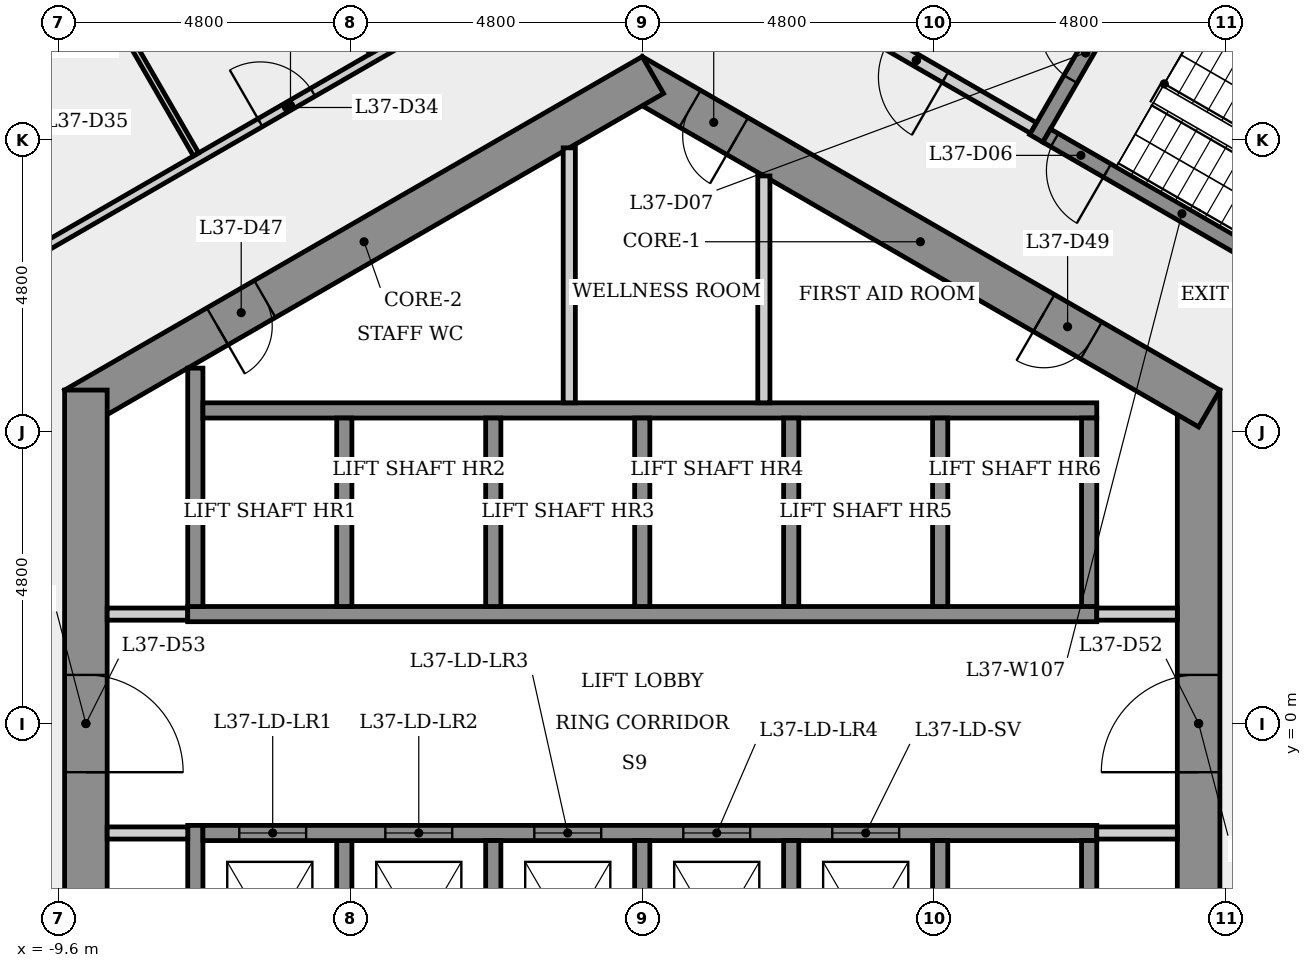
"""IFC4 building model, lengths in metres.
Left out: names, types, materials, properties, quantities, classifications, styles, units other than length and angle.
Written with IfcOpenShell. Run it as: python <this file> out.ifc"""

import sys

from ifc_helpers import new_model, si_unit, direction, frame, frame_2d, origin, place, context, subcontext, project, spatial, rectangle, extrude, element, fill, save


model = new_model("IFC4")
c1 = context("Model", 3, precision=1e-05, world=origin(), true_north=direction((0.0, 1.0)))
c2 = subcontext(c1, "Body", "Model", "MODEL_VIEW")
j1 = project(units=[si_unit("LENGTHUNIT", "METRE"), si_unit("PLANEANGLEUNIT", "RADIAN")], contexts=[c1])
p1 = place(None, origin())
s1 = spatial("IfcSite", under=j1, at=p1, CompositionType="ELEMENT")
p2 = place(p1, origin())
s2 = spatial("IfcBuilding", under=s1, at=p2, CompositionType="ELEMENT")
p3 = place(p2, frame((0.0, 0.0, 139.9)))
s3 = spatial("IfcBuildingStorey", under=s2, at=p3, CompositionType="ELEMENT", Elevation=139.9)
p4 = place(p3, frame((9.15, -5.485, 0.0), z_axis=(0.0, 0.0, 1.0), x_axis=(0.0, 1.0, 0.0)))
e1 = element("IfcWall", 1, at=p4, inside=s3, PredefinedType="SHEAR", context=c2, shape_type="SweptSolid", body=[
    extrude(rectangle(XDim=10.97, YDim=0.7, at=frame_2d((5.485, 0.0))), origin(), (0.0, 0.0, 1.0), 4.0),
])
p5 = place(p4, frame((4.685, 0.0, 0.0)))
e2 = element("IfcOpeningElement", 2, at=p5, cuts=e1, PredefinedType="OPENING", context=c2, shape_type="SweptSolid", body=[
    extrude(rectangle(XDim=1.6, YDim=2.1, at=frame_2d((0.8, 1.05))), frame((0.0, 0.36, 0.0), z_axis=(0.0, -1.0, 0.0), x_axis=(1.0, 0.0, 0.0)), (0.0, 0.0, 1.0), 0.72),
])
p6 = place(p3, frame((9.325, 5.182, 0.0), z_axis=(0.0, 0.0, 1.0), x_axis=(-0.866023993627, 0.500002442456, 0.0)))
e3 = element("IfcWall", 3, at=p6, inside=s3, PredefinedType="SHEAR", context=c2, shape_type="SweptSolid", body=[
    extrude(rectangle(XDim=10.97, YDim=0.7, at=frame_2d((5.485, 0.0))), origin(), (0.0, 0.0, 1.0), 4.0),
])
p7 = place(p6, frame((8.96, 0.0, 0.0)))
e4 = element("IfcOpeningElement", 4, at=p7, cuts=e3, PredefinedType="OPENING", context=c2, shape_type="SweptSolid", body=[
    extrude(rectangle(XDim=0.9, YDim=2.1, at=frame_2d((0.45, 1.05))), frame((0.0, 0.36, 0.0), z_axis=(0.0, -1.0, 0.0), x_axis=(1.0, 0.0, 0.0)), (0.0, 0.0, 1.0), 0.72),
])
p8 = place(p6, frame((2.24, 0.0, 0.0)))
e5 = element("IfcOpeningElement", 5, at=p8, cuts=e3, PredefinedType="OPENING", context=c2, shape_type="SweptSolid", body=[
    extrude(rectangle(XDim=0.9, YDim=2.1, at=frame_2d((0.45, 1.05))), frame((0.0, 0.36, 0.0), z_axis=(0.0, -1.0, 0.0), x_axis=(1.0, 0.0, 0.0)), (0.0, 0.0, 1.0), 0.72),
])
p9 = place(p3, frame((0.175, 10.667, 0.0), z_axis=(0.0, 0.0, 1.0), x_axis=(-0.866023993627, -0.500002442456, 0.0)))
e6 = element("IfcWall", 6, at=p9, inside=s3, PredefinedType="SHEAR", context=c2, shape_type="SweptSolid", body=[
    extrude(rectangle(XDim=10.97, YDim=0.7, at=frame_2d((5.485, 0.0))), origin(), (0.0, 0.0, 1.0), 4.0),
])
p10 = place(p9, frame((7.368, 0.0, 0.0)))
e7 = element("IfcOpeningElement", 7, at=p10, cuts=e6, PredefinedType="OPENING", context=c2, shape_type="SweptSolid", body=[
    extrude(rectangle(XDim=0.9, YDim=2.1, at=frame_2d((0.45, 1.05))), frame((0.0, 0.36, 0.0), z_axis=(0.0, -1.0, 0.0), x_axis=(1.0, 0.0, 0.0)), (0.0, 0.0, 1.0), 0.72),
])
p11 = place(p3, frame((-9.15, 5.485, 0.0), z_axis=(0.0, 0.0, 1.0), x_axis=(0.0, -1.0, 0.0)))
e8 = element("IfcWall", 8, at=p11, inside=s3, PredefinedType="SHEAR", context=c2, shape_type="SweptSolid", body=[
    extrude(rectangle(XDim=10.97, YDim=0.7, at=frame_2d((5.485, 0.0))), origin(), (0.0, 0.0, 1.0), 4.0),
])
p12 = place(p11, frame((4.685, 0.0, 0.0)))
e9 = element("IfcOpeningElement", 9, at=p12, cuts=e8, PredefinedType="OPENING", context=c2, shape_type="SweptSolid", body=[
    extrude(rectangle(XDim=1.6, YDim=2.1, at=frame_2d((0.8, 1.05))), frame((0.0, 0.36, 0.0), z_axis=(0.0, -1.0, 0.0), x_axis=(1.0, 0.0, 0.0)), (0.0, 0.0, 1.0), 0.72),
])
p13 = place(p3, frame((-10.136, 7.658, 0.0), z_axis=(0.0, 0.0, 1.0), x_axis=(0.866041139319, 0.499972744263, 0.0)))
e10 = element("IfcWall", 10, at=p13, inside=s3, PredefinedType="PARTITIONING", context=c2, shape_type="SweptSolid", body=[
    extrude(rectangle(XDim=10.048, YDim=0.15, at=frame_2d((5.024, 0.0))), origin(), (0.0, 0.0, 1.0), 3.6),
])
p14 = place(p13, frame((4.449, 0.0, 0.0)))
e11 = element("IfcOpeningElement", 11, at=p14, cuts=e10, PredefinedType="OPENING", context=c2, shape_type="SweptSolid", body=[
    extrude(rectangle(XDim=1.0, YDim=2.1, at=frame_2d((0.5, 1.05))), frame((0.0, 0.085, 0.0), z_axis=(0.0, -1.0, 0.0), x_axis=(1.0, 0.0, 0.0)), (0.0, 0.0, 1.0), 0.17),
])
p15 = place(p3, frame((-8.8, 1.8, 0.0), z_axis=(0.0, 0.0, 1.0), x_axis=(1.0, 0.0, 0.0)))
e12 = element("IfcWall", 12, at=p15, inside=s3, PredefinedType="PARTITIONING", context=c2, shape_type="SweptSolid", body=[
    extrude(rectangle(XDim=1.325, YDim=0.2, at=frame_2d((0.663, 0.0))), origin(), (0.0, 0.0, 1.0), 3.6),
])
p16 = place(p3, frame((-7.475, 1.8, 0.0), z_axis=(0.0, 0.0, 1.0), x_axis=(1.0, 0.0, 0.0)))
e13 = element("IfcWall", 13, at=p16, inside=s3, PredefinedType="SHEAR", context=c2, shape_type="SweptSolid", body=[
    extrude(rectangle(XDim=14.95, YDim=0.25, at=frame_2d((7.475, 0.0))), origin(), (0.0, 0.0, 1.0), 3.6),
])
p17 = place(p3, frame((-7.35, -5.846, 0.0), z_axis=(0.0, 0.0, 1.0), x_axis=(0.0, 1.0, 0.0)))
e14 = element("IfcWall", 14, at=p17, inside=s3, PredefinedType="SHEAR", context=c2, shape_type="SweptSolid", body=[
    extrude(rectangle(XDim=4.171, YDim=0.25, at=frame_2d((2.085, 0.0))), origin(), (0.0, 0.0, 1.0), 3.6),
])
p18 = place(p3, frame((-7.35, 1.925, 0.0), z_axis=(0.0, 0.0, 1.0), x_axis=(0.0, 1.0, 0.0)))
e15 = element("IfcWall", 15, at=p18, inside=s3, PredefinedType="SHEAR", context=c2, shape_type="SweptSolid", body=[
    extrude(rectangle(XDim=3.921, YDim=0.25, at=frame_2d((1.96, 0.0))), origin(), (0.0, 0.0, 1.0), 3.6),
])
p19 = place(p3, frame((-7.225, 5.15, 0.0), z_axis=(0.0, 0.0, 1.0), x_axis=(1.0, 0.0, 0.0)))
e16 = element("IfcWall", 16, at=p19, inside=s3, PredefinedType="SHEAR", context=c2, shape_type="SweptSolid", body=[
    extrude(rectangle(XDim=14.7, YDim=0.25, at=frame_2d((7.35, 0.0))), origin(), (0.0, 0.0, 1.0), 3.6),
])
p20 = place(p3, frame((-7.475, -1.8, 0.0), z_axis=(0.0, 0.0, 1.0), x_axis=(-1.0, 0.0, 0.0)))
e17 = element("IfcWall", 17, at=p20, inside=s3, PredefinedType="PARTITIONING", context=c2, shape_type="SweptSolid", body=[
    extrude(rectangle(XDim=1.325, YDim=0.2, at=frame_2d((0.663, 0.0))), origin(), (0.0, 0.0, 1.0), 3.6),
])
for number, where, z_axis, x_axis in (
    (18, (-7.338, 9.36, 0.0), (0.0, 0.0, 1.0), (-0.5, 0.866, 0.0)),
    (19, (-8.292, 17.712, 0.0), (0.0, 0.0, 1.0), (0.5, -0.866, 0.0)),
):
    element("IfcWall", number, at=place(p3, frame(where, z_axis=z_axis, x_axis=x_axis)), inside=s3, PredefinedType="PARTITIONING", context=c2, shape_type="SweptSolid", body=[
        extrude(rectangle(XDim=7.71, YDim=0.1, at=frame_2d((3.855, 0.0))), origin(), (0.0, 0.0, 1.0), 3.6),
    ])
for number, where, z_axis, x_axis in (
    (20, (-4.9, -1.925, 0.0), (0.0, 0.0, 1.0), (0.0, -1.0, 0.0)),
    (21, (-4.9, 5.025, 0.0), (0.0, 0.0, 1.0), (0.0, -1.0, 0.0)),
):
    element("IfcWall", number, at=place(p3, frame(where, z_axis=z_axis, x_axis=x_axis)), inside=s3, PredefinedType="SHEAR", context=c2, shape_type="SweptSolid", body=[
        extrude(rectangle(XDim=3.1, YDim=0.25, at=frame_2d((1.55, 0.0))), origin(), (0.0, 0.0, 1.0), 4.0),
    ])
p21 = place(p3, frame((-7.225, -1.8, 0.0), z_axis=(0.0, 0.0, 1.0), x_axis=(1.0, 0.0, 0.0)))
e22 = element("IfcWall", 22, at=p21, inside=s3, PredefinedType="SHEAR", context=c2, shape_type="SweptSolid", body=[
    extrude(rectangle(XDim=14.7, YDim=0.25, at=frame_2d((7.35, 0.0))), origin(), (0.0, 0.0, 1.0), 3.6),
])
p22 = place(p21, frame((0.597, 0.0, 0.0)))
e23 = element("IfcOpeningElement", 23, at=p22, cuts=e22, PredefinedType="OPENING", context=c2, shape_type="SweptSolid", body=[
    extrude(rectangle(XDim=1.1, YDim=2.1, at=frame_2d((0.55, 1.05))), frame((0.0, 0.135, 0.0), z_axis=(0.0, -1.0, 0.0), x_axis=(1.0, 0.0, 0.0)), (0.0, 0.0, 1.0), 0.27),
])
p23 = place(p21, frame((3.0, 0.0, 0.0)))
e24 = element("IfcOpeningElement", 24, at=p23, cuts=e22, PredefinedType="OPENING", context=c2, shape_type="SweptSolid", body=[
    extrude(rectangle(XDim=1.1, YDim=2.1, at=frame_2d((0.55, 1.05))), frame((0.0, 0.135, 0.0), z_axis=(0.0, -1.0, 0.0), x_axis=(1.0, 0.0, 0.0)), (0.0, 0.0, 1.0), 0.27),
])
p24 = place(p21, frame((5.45, 0.0, 0.0)))
e25 = element("IfcOpeningElement", 25, at=p24, cuts=e22, PredefinedType="OPENING", context=c2, shape_type="SweptSolid", body=[
    extrude(rectangle(XDim=1.1, YDim=2.1, at=frame_2d((0.55, 1.05))), frame((0.0, 0.135, 0.0), z_axis=(0.0, -1.0, 0.0), x_axis=(1.0, 0.0, 0.0)), (0.0, 0.0, 1.0), 0.27),
])
p25 = place(p21, frame((7.9, 0.0, 0.0)))
e26 = element("IfcOpeningElement", 26, at=p25, cuts=e22, PredefinedType="OPENING", context=c2, shape_type="SweptSolid", body=[
    extrude(rectangle(XDim=1.1, YDim=2.1, at=frame_2d((0.55, 1.05))), frame((0.0, 0.135, 0.0), z_axis=(0.0, -1.0, 0.0), x_axis=(1.0, 0.0, 0.0)), (0.0, 0.0, 1.0), 0.27),
])
p26 = place(p21, frame((10.35, 0.0, 0.0)))
e27 = element("IfcOpeningElement", 27, at=p26, cuts=e22, PredefinedType="OPENING", context=c2, shape_type="SweptSolid", body=[
    extrude(rectangle(XDim=1.1, YDim=2.1, at=frame_2d((0.55, 1.05))), frame((0.0, 0.135, 0.0), z_axis=(0.0, -1.0, 0.0), x_axis=(1.0, 0.0, 0.0)), (0.0, 0.0, 1.0), 0.27),
])
for number, where, z_axis, x_axis in (
    (28, (-2.45, -1.925, 0.0), (0.0, 0.0, 1.0), (0.0, -1.0, 0.0)),
    (29, (-2.45, 5.025, 0.0), (0.0, 0.0, 1.0), (0.0, -1.0, 0.0)),
):
    element("IfcWall", number, at=place(p3, frame(where, z_axis=z_axis, x_axis=x_axis)), inside=s3, PredefinedType="SHEAR", context=c2, shape_type="SweptSolid", body=[
        extrude(rectangle(XDim=3.1, YDim=0.25, at=frame_2d((1.55, 0.0))), origin(), (0.0, 0.0, 1.0), 4.0),
    ])
p27 = place(p3, frame((-1.2, 9.469, 0.0), z_axis=(0.0, 0.0, 1.0), x_axis=(0.0, -1.0, 0.0)))
e30 = element("IfcWall", 30, at=p27, inside=s3, PredefinedType="PARTITIONING", context=c2, shape_type="SweptSolid", body=[
    extrude(rectangle(XDim=4.194, YDim=0.2, at=frame_2d((2.097, 0.0))), origin(), (0.0, 0.0, 1.0), 3.6),
])
for number, where, z_axis, x_axis in (
    (31, (0.0, -1.925, 0.0), (0.0, 0.0, 1.0), (0.0, -1.0, 0.0)),
    (32, (0.0, 5.025, 0.0), (0.0, 0.0, 1.0), (0.0, -1.0, 0.0)),
):
    element("IfcWall", number, at=place(p3, frame(where, z_axis=z_axis, x_axis=x_axis)), inside=s3, PredefinedType="SHEAR", context=c2, shape_type="SweptSolid", body=[
        extrude(rectangle(XDim=3.1, YDim=0.25, at=frame_2d((1.55, 0.0))), origin(), (0.0, 0.0, 1.0), 4.0),
    ])
p28 = place(p3, frame((2.0, 9.007, 0.0), z_axis=(0.0, 0.0, 1.0), x_axis=(0.0, -1.0, 0.0)))
e33 = element("IfcWall", 33, at=p28, inside=s3, PredefinedType="PARTITIONING", context=c2, shape_type="SweptSolid", body=[
    extrude(rectangle(XDim=3.732, YDim=0.2, at=frame_2d((1.866, 0.0))), origin(), (0.0, 0.0, 1.0), 3.6),
])
for number, where, z_axis, x_axis in (
    (34, (2.45, -1.925, 0.0), (0.0, 0.0, 1.0), (0.0, -1.0, 0.0)),
    (35, (2.45, 5.025, 0.0), (0.0, 0.0, 1.0), (0.0, -1.0, 0.0)),
    (36, (4.9, -1.925, 0.0), (0.0, 0.0, 1.0), (0.0, -1.0, 0.0)),
    (37, (4.9, 5.025, 0.0), (0.0, 0.0, 1.0), (0.0, -1.0, 0.0)),
):
    element("IfcWall", number, at=place(p3, frame(where, z_axis=z_axis, x_axis=x_axis)), inside=s3, PredefinedType="SHEAR", context=c2, shape_type="SweptSolid", body=[
        extrude(rectangle(XDim=3.1, YDim=0.25, at=frame_2d((1.55, 0.0))), origin(), (0.0, 0.0, 1.0), 4.0),
    ])
p29 = place(p3, frame((6.435, 9.795, 0.0), z_axis=(0.0, 0.0, 1.0), x_axis=(-0.866012907634, 0.500021643343, 0.0)))
e38 = element("IfcWall", 38, at=p29, inside=s3, PredefinedType="PARTITIONING", context=c2, shape_type="SweptSolid", body=[
    extrude(rectangle(XDim=4.45, YDim=0.2, at=frame_2d((2.225, 0.0))), origin(), (0.0, 0.0, 1.0), 3.6),
])
p30 = place(p29, frame((1.675, 0.0, 0.0)))
e39 = element("IfcOpeningElement", 39, at=p30, cuts=e38, PredefinedType="OPENING", context=c2, shape_type="SweptSolid", body=[
    extrude(rectangle(XDim=1.1, YDim=2.1, at=frame_2d((0.55, 1.05))), frame((0.0, 0.11, 0.0), z_axis=(0.0, -1.0, 0.0), x_axis=(1.0, 0.0, 0.0)), (0.0, 0.0, 1.0), 0.22),
])
p31 = place(p3, frame((6.48, 9.624, 0.0), z_axis=(0.0, 0.0, 1.0), x_axis=(0.500017246033, 0.866015446554, 0.0)))
e40 = element("IfcWall", 40, at=p31, inside=s3, PredefinedType="SHEAR", context=c2, shape_type="SweptSolid", body=[
    extrude(rectangle(XDim=3.25, YDim=0.25, at=frame_2d((1.625, 0.0))), origin(), (0.0, 0.0, 1.0), 3.6),
])
p32 = place(p31, frame((1.125, 0.0, 0.0)))
e41 = element("IfcOpeningElement", 41, at=p32, cuts=e40, PredefinedType="OPENING", context=c2, shape_type="SweptSolid", body=[
    extrude(rectangle(XDim=1.0, YDim=2.1, at=frame_2d((0.5, 1.05))), frame((0.0, 0.135, 0.0), z_axis=(0.0, -1.0, 0.0), x_axis=(1.0, 0.0, 0.0)), (0.0, 0.0, 1.0), 0.27),
])
p33 = place(p3, frame((7.475, 1.8, 0.0), z_axis=(0.0, 0.0, 1.0), x_axis=(1.0, 0.0, 0.0)))
e42 = element("IfcWall", 42, at=p33, inside=s3, PredefinedType="PARTITIONING", context=c2, shape_type="SweptSolid", body=[
    extrude(rectangle(XDim=1.325, YDim=0.2, at=frame_2d((0.663, 0.0))), origin(), (0.0, 0.0, 1.0), 3.6),
])
for number, where, z_axis, x_axis in (
    (43, (7.35, -1.925, 0.0), (0.0, 0.0, 1.0), (0.0, -1.0, 0.0)),
    (44, (7.35, 5.025, 0.0), (0.0, 0.0, 1.0), (0.0, -1.0, 0.0)),
):
    element("IfcWall", number, at=place(p3, frame(where, z_axis=z_axis, x_axis=x_axis)), inside=s3, PredefinedType="SHEAR", context=c2, shape_type="SweptSolid", body=[
        extrude(rectangle(XDim=3.1, YDim=0.25, at=frame_2d((1.55, 0.0))), origin(), (0.0, 0.0, 1.0), 4.0),
    ])
p34 = place(p3, frame((8.151, 12.268, 0.0), z_axis=(0.0, 0.0, 1.0), x_axis=(0.866025499775, -0.499999833739, 0.0)))
e45 = element("IfcWall", 45, at=p34, inside=s3, PredefinedType="SHEAR", context=c2, shape_type="SweptSolid", body=[
    extrude(rectangle(XDim=6.4, YDim=0.25, at=frame_2d((3.2, 0.0))), origin(), (0.0, 0.0, 1.0), 3.6),
])
p35 = place(p3, frame((8.8, -1.8, 0.0), z_axis=(0.0, 0.0, 1.0), x_axis=(-1.0, 0.0, 0.0)))
e46 = element("IfcWall", 46, at=p35, inside=s3, PredefinedType="PARTITIONING", context=c2, shape_type="SweptSolid", body=[
    extrude(rectangle(XDim=1.325, YDim=0.2, at=frame_2d((0.663, 0.0))), origin(), (0.0, 0.0, 1.0), 3.6),
])
p36 = place(p3, frame((11.1, 7.101, 0.0), z_axis=(0.0, 0.0, 1.0), x_axis=(-0.8660265141, 0.499998076872, 0.0)))
e47 = element("IfcWall", 47, at=p36, inside=s3, PredefinedType="SHEAR", context=c2, shape_type="SweptSolid", body=[
    extrude(rectangle(XDim=5.137, YDim=0.25, at=frame_2d((2.569, 0.0))), origin(), (0.0, 0.0, 1.0), 3.6),
])
p37 = place(p36, frame((3.987, 0.0, 0.0)))
e48 = element("IfcOpeningElement", 48, at=p37, cuts=e47, PredefinedType="OPENING", context=c2, shape_type="SweptSolid", body=[
    extrude(rectangle(XDim=1.0, YDim=2.1, at=frame_2d((0.5, 1.05))), frame((0.0, 0.135, 0.0), z_axis=(0.0, -1.0, 0.0), x_axis=(1.0, 0.0, 0.0)), (0.0, 0.0, 1.0), 0.27),
])
p38 = place(p22, origin())
e49 = element("IfcDoor", 49, at=p38, inside=s3, OperationType="SLIDING_TO_LEFT", PredefinedType="DOOR", context=c2, shape_type="SweptSolid", body=[
    extrude(rectangle(XDim=1.1, YDim=2.1, at=frame_2d((0.55, 1.05))), frame((0.0, 0.025, 0.0), z_axis=(0.0, -1.0, 0.0), x_axis=(1.0, 0.0, 0.0)), (0.0, 0.0, 1.0), 0.05),
])
fill(e23, e49)
p39 = place(p23, origin())
e50 = element("IfcDoor", 50, at=p39, inside=s3, OperationType="SLIDING_TO_LEFT", PredefinedType="DOOR", context=c2, shape_type="SweptSolid", body=[
    extrude(rectangle(XDim=1.1, YDim=2.1, at=frame_2d((0.55, 1.05))), frame((0.0, 0.025, 0.0), z_axis=(0.0, -1.0, 0.0), x_axis=(1.0, 0.0, 0.0)), (0.0, 0.0, 1.0), 0.05),
])
fill(e24, e50)
p40 = place(p24, origin())
e51 = element("IfcDoor", 51, at=p40, inside=s3, OperationType="SLIDING_TO_LEFT", PredefinedType="DOOR", context=c2, shape_type="SweptSolid", body=[
    extrude(rectangle(XDim=1.1, YDim=2.1, at=frame_2d((0.55, 1.05))), frame((0.0, 0.025, 0.0), z_axis=(0.0, -1.0, 0.0), x_axis=(1.0, 0.0, 0.0)), (0.0, 0.0, 1.0), 0.05),
])
fill(e25, e51)
p41 = place(p25, origin())
e52 = element("IfcDoor", 52, at=p41, inside=s3, OperationType="SLIDING_TO_LEFT", PredefinedType="DOOR", context=c2, shape_type="SweptSolid", body=[
    extrude(rectangle(XDim=1.1, YDim=2.1, at=frame_2d((0.55, 1.05))), frame((0.0, 0.025, 0.0), z_axis=(0.0, -1.0, 0.0), x_axis=(1.0, 0.0, 0.0)), (0.0, 0.0, 1.0), 0.05),
])
fill(e26, e52)
p42 = place(p26, origin())
e53 = element("IfcDoor", 53, at=p42, inside=s3, OperationType="SLIDING_TO_LEFT", PredefinedType="DOOR", context=c2, shape_type="SweptSolid", body=[
    extrude(rectangle(XDim=1.1, YDim=2.1, at=frame_2d((0.55, 1.05))), frame((0.0, 0.025, 0.0), z_axis=(0.0, -1.0, 0.0), x_axis=(1.0, 0.0, 0.0)), (0.0, 0.0, 1.0), 0.05),
])
fill(e27, e53)
p43 = place(p37, origin())
e54 = element("IfcDoor", 54, at=p43, inside=s3, OperationType="SINGLE_SWING_LEFT", PredefinedType="DOOR", context=c2, shape_type="SweptSolid", body=[
    extrude(rectangle(XDim=1.0, YDim=2.1, at=frame_2d((0.5, 1.05))), frame((0.0, 0.025, 0.0), z_axis=(0.0, -1.0, 0.0), x_axis=(1.0, 0.0, 0.0)), (0.0, 0.0, 1.0), 0.05),
])
fill(e48, e54)
p44 = place(p32, origin())
e55 = element("IfcDoor", 55, at=p44, inside=s3, OperationType="SINGLE_SWING_RIGHT", PredefinedType="DOOR", context=c2, shape_type="SweptSolid", body=[
    extrude(rectangle(XDim=1.0, YDim=2.1, at=frame_2d((0.5, 1.05))), frame((0.0, 0.025, 0.0), z_axis=(0.0, -1.0, 0.0), x_axis=(1.0, 0.0, 0.0)), (0.0, 0.0, 1.0), 0.05),
])
fill(e41, e55)
p45 = place(p30, origin())
e56 = element("IfcDoor", 56, at=p45, inside=s3, OperationType="SINGLE_SWING_LEFT", PredefinedType="DOOR", context=c2, shape_type="SweptSolid", body=[
    extrude(rectangle(XDim=1.1, YDim=2.1, at=frame_2d((0.55, 1.05))), frame((0.0, 0.025, 0.0), z_axis=(0.0, -1.0, 0.0), x_axis=(1.0, 0.0, 0.0)), (0.0, 0.0, 1.0), 0.05),
])
fill(e39, e56)
p46 = place(p14, origin())
e57 = element("IfcDoor", 57, at=p46, inside=s3, OperationType="SINGLE_SWING_LEFT", PredefinedType="DOOR", context=c2, shape_type="SweptSolid", body=[
    extrude(rectangle(XDim=1.0, YDim=2.1, at=frame_2d((0.5, 1.05))), frame((0.0, 0.025, 0.0), z_axis=(0.0, -1.0, 0.0), x_axis=(1.0, 0.0, 0.0)), (0.0, 0.0, 1.0), 0.05),
])
fill(e11, e57)
p47 = place(p10, origin())
e58 = element("IfcDoor", 58, at=p47, inside=s3, OperationType="SINGLE_SWING_RIGHT", PredefinedType="DOOR", context=c2, shape_type="SweptSolid", body=[
    extrude(rectangle(XDim=0.9, YDim=2.1, at=frame_2d((0.45, 1.05))), frame((0.0, 0.025, 0.0), z_axis=(0.0, -1.0, 0.0), x_axis=(1.0, 0.0, 0.0)), (0.0, 0.0, 1.0), 0.05),
])
fill(e7, e58)
p48 = place(p7, origin())
e59 = element("IfcDoor", 59, at=p48, inside=s3, OperationType="SINGLE_SWING_LEFT", PredefinedType="DOOR", context=c2, shape_type="SweptSolid", body=[
    extrude(rectangle(XDim=0.9, YDim=2.1, at=frame_2d((0.45, 1.05))), frame((0.0, 0.025, 0.0), z_axis=(0.0, -1.0, 0.0), x_axis=(1.0, 0.0, 0.0)), (0.0, 0.0, 1.0), 0.05),
])
fill(e4, e59)
p49 = place(p8, origin())
e60 = element("IfcDoor", 60, at=p49, inside=s3, OperationType="SINGLE_SWING_RIGHT", PredefinedType="DOOR", context=c2, shape_type="SweptSolid", body=[
    extrude(rectangle(XDim=0.9, YDim=2.1, at=frame_2d((0.45, 1.05))), frame((0.0, 0.025, 0.0), z_axis=(0.0, -1.0, 0.0), x_axis=(1.0, 0.0, 0.0)), (0.0, 0.0, 1.0), 0.05),
])
fill(e5, e60)
p50 = place(p5, origin())
e61 = element("IfcDoor", 61, at=p50, inside=s3, OperationType="SINGLE_SWING_LEFT", PredefinedType="DOOR", context=c2, shape_type="SweptSolid", body=[
    extrude(rectangle(XDim=1.6, YDim=2.1, at=frame_2d((0.8, 1.05))), frame((0.0, 0.025, 0.0), z_axis=(0.0, -1.0, 0.0), x_axis=(1.0, 0.0, 0.0)), (0.0, 0.0, 1.0), 0.05),
])
fill(e2, e61)
p51 = place(p12, origin())
e62 = element("IfcDoor", 62, at=p51, inside=s3, OperationType="SINGLE_SWING_RIGHT", PredefinedType="DOOR", context=c2, shape_type="SweptSolid", body=[
    extrude(rectangle(XDim=1.6, YDim=2.1, at=frame_2d((0.8, 1.05))), frame((0.0, 0.025, 0.0), z_axis=(0.0, -1.0, 0.0), x_axis=(1.0, 0.0, 0.0)), (0.0, 0.0, 1.0), 0.05),
])
fill(e9, e62)
save(model, sys.argv[1])
